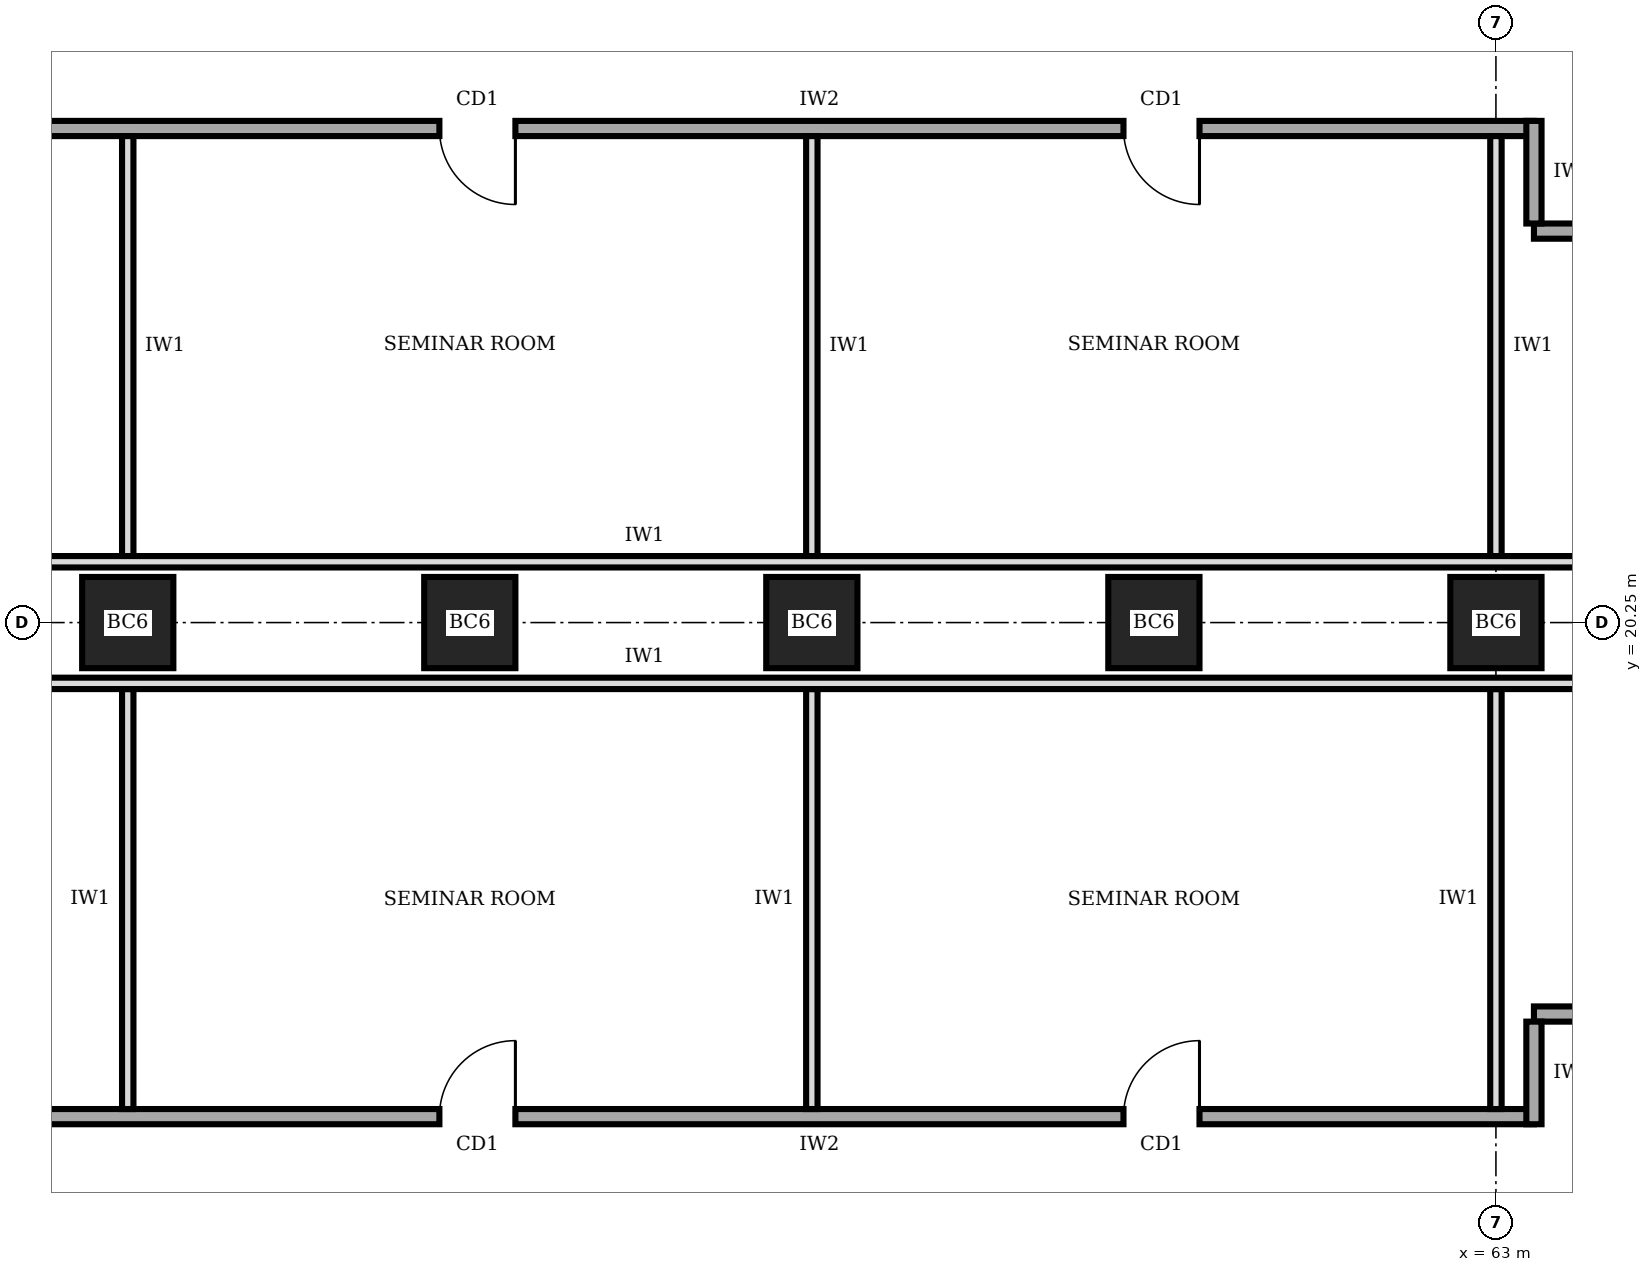
"""IFC4 building model, lengths in metres.
Left out: names, types, materials, properties, quantities, classifications, styles, units other than length and angle.
Written with IfcOpenShell. Run it as: python <this file> out.ifc"""

import sys

from ifc_helpers import new_model, si_unit, direction, frame, frame_2d, origin, origin_2d, place, context, subcontext, project, spatial, rectangle, extrude, element, fill, save


model = new_model("IFC4")
c1 = context("Model", 3, precision=1e-05, world=origin(), true_north=direction((0.0, 1.0)))
c2 = subcontext(c1, "Body", "Model", "MODEL_VIEW")
j1 = project(units=[si_unit("LENGTHUNIT", "METRE"), si_unit("PLANEANGLEUNIT", "RADIAN")], contexts=[c1])
p1 = place(None, origin())
s1 = spatial("IfcSite", under=j1, at=p1, CompositionType="ELEMENT")
p2 = place(p1, origin())
s2 = spatial("IfcBuilding", under=s1, at=p2, CompositionType="ELEMENT")
p3 = place(p2, frame((0.0, 0.0, 121.0)))
s3 = spatial("IfcBuildingStorey", under=s2, at=p3, CompositionType="ELEMENT", Elevation=121.0)
for number, where, z_axis, x_axis in (
    (1, (45.0, 20.25, 0.0), (0.0, 0.0, 1.0), (1.0, 0.0, 0.0)),
    (2, (49.5, 20.25, 0.0), (0.0, 0.0, 1.0), (1.0, 0.0, 0.0)),
    (3, (54.0, 20.25, 0.0), (0.0, 0.0, 1.0), (1.0, 0.0, 0.0)),
    (4, (58.5, 20.25, 0.0), (0.0, 0.0, 1.0), (1.0, 0.0, 0.0)),
    (5, (63.0, 20.25, 0.0), (0.0, 0.0, 1.0), (1.0, 0.0, 0.0)),
):
    element("IfcColumn", number, at=place(p3, frame(where, z_axis=z_axis, x_axis=x_axis)), inside=s3, PredefinedType="COLUMN", context=c2, shape_type="SweptSolid", body=[
        extrude(rectangle(XDim=1.2, YDim=1.2, at=origin_2d()), origin(), (0.0, 0.0, 1.0), 4.0),
    ])
p4 = place(p3, frame((40.0, 13.75, 0.0), z_axis=(0.0, 0.0, 1.0), x_axis=(1.0, 0.0, 0.0)))
e6 = element("IfcWall", 6, at=p4, inside=s3, PredefinedType="SOLIDWALL", context=c2, shape_type="SweptSolid", body=[
    extrude(rectangle(XDim=23.5, YDim=0.2, at=frame_2d((11.75, 0.0))), origin(), (0.0, 0.0, 1.0), 3.75),
])
p5 = place(p4, frame((1.65, 0.0, 0.0)))
e7 = element("IfcOpeningElement", 7, at=p5, cuts=e6, PredefinedType="OPENING", context=c2, shape_type="SweptSolid", body=[
    extrude(rectangle(XDim=1.0, YDim=2.1, at=frame_2d((0.5, 1.05))), frame((0.0, 0.11, 0.0), z_axis=(0.0, -1.0, 0.0), x_axis=(1.0, 0.0, 0.0)), (0.0, 0.0, 1.0), 0.22),
])
p6 = place(p4, frame((9.1, 0.0, 0.0)))
e8 = element("IfcOpeningElement", 8, at=p6, cuts=e6, PredefinedType="OPENING", context=c2, shape_type="SweptSolid", body=[
    extrude(rectangle(XDim=1.0, YDim=2.1, at=frame_2d((0.5, 1.05))), frame((0.0, 0.11, 0.0), z_axis=(0.0, -1.0, 0.0), x_axis=(1.0, 0.0, 0.0)), (0.0, 0.0, 1.0), 0.22),
])
p7 = place(p4, frame((18.1, 0.0, 0.0)))
e9 = element("IfcOpeningElement", 9, at=p7, cuts=e6, PredefinedType="OPENING", context=c2, shape_type="SweptSolid", body=[
    extrude(rectangle(XDim=1.0, YDim=2.1, at=frame_2d((0.5, 1.05))), frame((0.0, 0.11, 0.0), z_axis=(0.0, -1.0, 0.0), x_axis=(1.0, 0.0, 0.0)), (0.0, 0.0, 1.0), 0.22),
])
p8 = place(p3, frame((63.5, 15.1, 0.0), z_axis=(0.0, 0.0, 1.0), x_axis=(1.0, 0.0, 0.0)))
e10 = element("IfcWall", 10, at=p8, inside=s3, PredefinedType="SOLIDWALL", context=c2, shape_type="SweptSolid", body=[
    extrude(rectangle(XDim=4.0, YDim=0.2, at=frame_2d((2.0, 0.0))), origin(), (0.0, 0.0, 1.0), 3.75),
])
p9 = place(p8, frame((1.4, 0.0, 0.0)))
e11 = element("IfcOpeningElement", 11, at=p9, cuts=e10, PredefinedType="OPENING", context=c2, shape_type="SweptSolid", body=[
    extrude(rectangle(XDim=1.0, YDim=2.1, at=frame_2d((0.5, 1.05))), frame((0.0, 0.11, 0.0), z_axis=(0.0, -1.0, 0.0), x_axis=(1.0, 0.0, 0.0)), (0.0, 0.0, 1.0), 0.22),
])
p10 = place(p3, frame((63.5, 13.65, 0.0), z_axis=(0.0, 0.0, 1.0), x_axis=(0.0, 1.0, 0.0)))
e12 = element("IfcWall", 12, at=p10, inside=s3, PredefinedType="SOLIDWALL", context=c2, shape_type="SweptSolid", body=[
    extrude(rectangle(XDim=1.35, YDim=0.2, at=frame_2d((0.675, 0.0))), origin(), (0.0, 0.0, 1.0), 3.75),
])
p11 = place(p3, frame((40.0, 26.75, 0.0), z_axis=(0.0, 0.0, 1.0), x_axis=(1.0, 0.0, 0.0)))
e13 = element("IfcWall", 13, at=p11, inside=s3, PredefinedType="SOLIDWALL", context=c2, shape_type="SweptSolid", body=[
    extrude(rectangle(XDim=23.5, YDim=0.2, at=frame_2d((11.75, 0.0))), origin(), (0.0, 0.0, 1.0), 3.75),
])
p12 = place(p11, frame((1.65, 0.0, 0.0)))
e14 = element("IfcOpeningElement", 14, at=p12, cuts=e13, PredefinedType="OPENING", context=c2, shape_type="SweptSolid", body=[
    extrude(rectangle(XDim=1.0, YDim=2.1, at=frame_2d((0.5, 1.05))), frame((0.0, 0.11, 0.0), z_axis=(0.0, -1.0, 0.0), x_axis=(1.0, 0.0, 0.0)), (0.0, 0.0, 1.0), 0.22),
])
p13 = place(p11, frame((9.1, 0.0, 0.0)))
e15 = element("IfcOpeningElement", 15, at=p13, cuts=e13, PredefinedType="OPENING", context=c2, shape_type="SweptSolid", body=[
    extrude(rectangle(XDim=1.0, YDim=2.1, at=frame_2d((0.5, 1.05))), frame((0.0, 0.11, 0.0), z_axis=(0.0, -1.0, 0.0), x_axis=(1.0, 0.0, 0.0)), (0.0, 0.0, 1.0), 0.22),
])
p14 = place(p11, frame((18.1, 0.0, 0.0)))
e16 = element("IfcOpeningElement", 16, at=p14, cuts=e13, PredefinedType="OPENING", context=c2, shape_type="SweptSolid", body=[
    extrude(rectangle(XDim=1.0, YDim=2.1, at=frame_2d((0.5, 1.05))), frame((0.0, 0.11, 0.0), z_axis=(0.0, -1.0, 0.0), x_axis=(1.0, 0.0, 0.0)), (0.0, 0.0, 1.0), 0.22),
])
p15 = place(p3, frame((63.5, 25.4, 0.0), z_axis=(0.0, 0.0, 1.0), x_axis=(1.0, 0.0, 0.0)))
e17 = element("IfcWall", 17, at=p15, inside=s3, PredefinedType="SOLIDWALL", context=c2, shape_type="SweptSolid", body=[
    extrude(rectangle(XDim=4.0, YDim=0.2, at=frame_2d((2.0, 0.0))), origin(), (0.0, 0.0, 1.0), 3.75),
])
p16 = place(p15, frame((1.4, 0.0, 0.0)))
e18 = element("IfcOpeningElement", 18, at=p16, cuts=e17, PredefinedType="OPENING", context=c2, shape_type="SweptSolid", body=[
    extrude(rectangle(XDim=1.0, YDim=2.1, at=frame_2d((0.5, 1.05))), frame((0.0, 0.11, 0.0), z_axis=(0.0, -1.0, 0.0), x_axis=(1.0, 0.0, 0.0)), (0.0, 0.0, 1.0), 0.22),
])
p17 = place(p3, frame((63.5, 26.85, 0.0), z_axis=(0.0, 0.0, 1.0), x_axis=(0.0, -1.0, 0.0)))
e19 = element("IfcWall", 19, at=p17, inside=s3, PredefinedType="SOLIDWALL", context=c2, shape_type="SweptSolid", body=[
    extrude(rectangle(XDim=1.35, YDim=0.2, at=frame_2d((0.675, 0.0))), origin(), (0.0, 0.0, 1.0), 3.75),
])
for number, where, z_axis, x_axis in (
    (20, (37.32, 19.45, 0.0), (0.0, 0.0, 1.0), (1.0, 0.0, 0.0)),
    (21, (37.32, 21.05, 0.0), (0.0, 0.0, 1.0), (1.0, 0.0, 0.0)),
):
    element("IfcWall", number, at=place(p3, frame(where, z_axis=z_axis, x_axis=x_axis)), inside=s3, PredefinedType="PARTITIONING", context=c2, shape_type="SweptSolid", body=[
        extrude(rectangle(XDim=28.96, YDim=0.15, at=frame_2d((14.48, 0.0))), origin(), (0.0, 0.0, 1.0), 3.75),
    ])
for number, where, z_axis, x_axis in (
    (22, (45.0, 13.85, 0.0), (0.0, 0.0, 1.0), (0.0, 1.0, 0.0)),
    (23, (54.0, 13.85, 0.0), (0.0, 0.0, 1.0), (0.0, 1.0, 0.0)),
    (24, (63.0, 13.85, 0.0), (0.0, 0.0, 1.0), (0.0, 1.0, 0.0)),
    (25, (45.0, 26.65, 0.0), (0.0, 0.0, 1.0), (0.0, -1.0, 0.0)),
    (26, (54.0, 26.65, 0.0), (0.0, 0.0, 1.0), (0.0, -1.0, 0.0)),
    (27, (63.0, 26.65, 0.0), (0.0, 0.0, 1.0), (0.0, -1.0, 0.0)),
):
    element("IfcWall", number, at=place(p3, frame(where, z_axis=z_axis, x_axis=x_axis)), inside=s3, PredefinedType="PARTITIONING", context=c2, shape_type="SweptSolid", body=[
        extrude(rectangle(XDim=5.525, YDim=0.15, at=frame_2d((2.762, 0.0))), origin(), (0.0, 0.0, 1.0), 2.83),
    ])
p18 = place(p6, origin())
e28 = element("IfcDoor", 28, at=p18, inside=s3, OperationType="SINGLE_SWING_RIGHT", PredefinedType="DOOR", context=c2, shape_type="SweptSolid", body=[
    extrude(rectangle(XDim=1.0, YDim=2.1, at=frame_2d((0.5, 1.05))), frame((0.0, 0.025, 0.0), z_axis=(0.0, -1.0, 0.0), x_axis=(1.0, 0.0, 0.0)), (0.0, 0.0, 1.0), 0.05),
])
fill(e8, e28)
p19 = place(p7, origin())
e29 = element("IfcDoor", 29, at=p19, inside=s3, OperationType="SINGLE_SWING_RIGHT", PredefinedType="DOOR", context=c2, shape_type="SweptSolid", body=[
    extrude(rectangle(XDim=1.0, YDim=2.1, at=frame_2d((0.5, 1.05))), frame((0.0, 0.025, 0.0), z_axis=(0.0, -1.0, 0.0), x_axis=(1.0, 0.0, 0.0)), (0.0, 0.0, 1.0), 0.05),
])
fill(e9, e29)
p20 = place(p13, frame((1.0, 0.0, 0.0), z_axis=(0.0, 0.0, 1.0), x_axis=(-1.0, 0.0, 0.0)))
e30 = element("IfcDoor", 30, at=p20, inside=s3, OperationType="SINGLE_SWING_LEFT", PredefinedType="DOOR", context=c2, shape_type="SweptSolid", body=[
    extrude(rectangle(XDim=1.0, YDim=2.1, at=frame_2d((0.5, 1.05))), frame((0.0, 0.025, 0.0), z_axis=(0.0, -1.0, 0.0), x_axis=(1.0, 0.0, 0.0)), (0.0, 0.0, 1.0), 0.05),
])
fill(e15, e30)
p21 = place(p14, frame((1.0, 0.0, 0.0), z_axis=(0.0, 0.0, 1.0), x_axis=(-1.0, 0.0, 0.0)))
e31 = element("IfcDoor", 31, at=p21, inside=s3, OperationType="SINGLE_SWING_LEFT", PredefinedType="DOOR", context=c2, shape_type="SweptSolid", body=[
    extrude(rectangle(XDim=1.0, YDim=2.1, at=frame_2d((0.5, 1.05))), frame((0.0, 0.025, 0.0), z_axis=(0.0, -1.0, 0.0), x_axis=(1.0, 0.0, 0.0)), (0.0, 0.0, 1.0), 0.05),
])
fill(e16, e31)
save(model, sys.argv[1])
